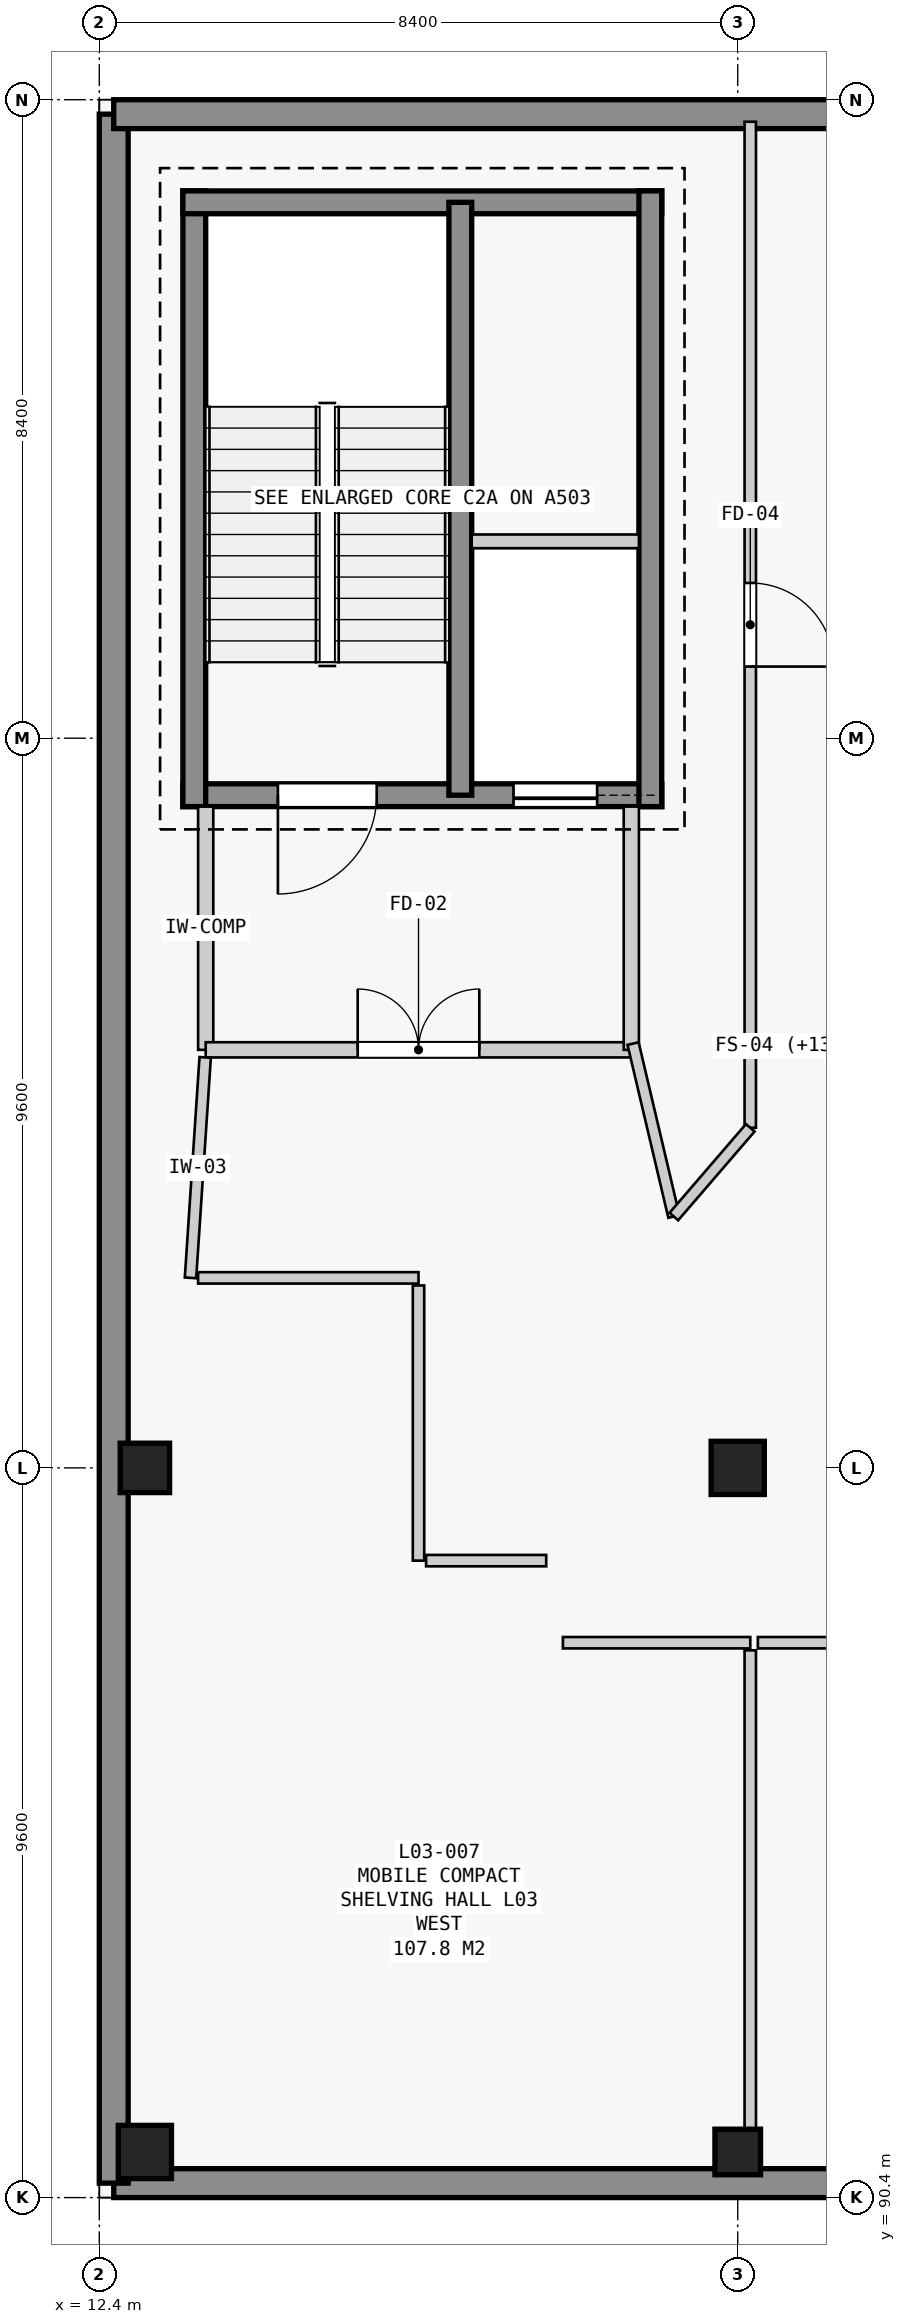
"""IFC4 building model, lengths in metres.
Left out: names, types, materials, properties, quantities, classifications, styles, units other than length and angle.
Written with IfcOpenShell. Run it as: python <this file> out.ifc"""

import sys

from ifc_helpers import new_model, si_unit, direction, frame, frame_2d, origin, origin_2d, place, context, subcontext, project, spatial, rectangle, extrude, element, fill, save


model = new_model("IFC4")
c1 = context("Model", 3, precision=1e-05, world=origin(), true_north=direction((0.0, 1.0)))
c2 = subcontext(c1, "Body", "Model", "MODEL_VIEW")
j1 = project(units=[si_unit("LENGTHUNIT", "METRE"), si_unit("PLANEANGLEUNIT", "RADIAN")], contexts=[c1])
p1 = place(None, origin())
s1 = spatial("IfcSite", under=j1, at=p1, CompositionType="ELEMENT")
p2 = place(p1, origin())
s2 = spatial("IfcBuilding", under=s1, at=p2, CompositionType="ELEMENT")
p3 = place(p2, frame((0.0, 0.0, 13.8)))
s3 = spatial("IfcBuildingStorey", under=s2, at=p3, CompositionType="ELEMENT", Elevation=13.8)
p4 = place(p3, frame((13.0, 91.0, 0.0), z_axis=(0.0, 0.0, 1.0), x_axis=(1.0, 0.0, 0.0)))
e1 = element("IfcColumn", 1, at=p4, inside=s3, PredefinedType="COLUMN", context=c2, shape_type="SweptSolid", body=[
    extrude(rectangle(XDim=0.7, YDim=0.7, at=origin_2d()), origin(), (0.0, 0.0, 1.0), 4.5),
])
p5 = place(p3, frame((13.0, 100.0, 0.0), z_axis=(0.0, 0.0, 1.0), x_axis=(1.0, 0.0, 0.0)))
e2 = element("IfcColumn", 2, at=p5, inside=s3, PredefinedType="COLUMN", context=c2, shape_type="SweptSolid", body=[
    extrude(rectangle(XDim=0.65, YDim=0.65, at=origin_2d()), origin(), (0.0, 0.0, 1.0), 4.5),
])
p6 = place(p3, frame((20.8, 91.0, 0.0), z_axis=(0.0, 0.0, 1.0), x_axis=(1.0, 0.0, 0.0)))
e3 = element("IfcColumn", 3, at=p6, inside=s3, PredefinedType="COLUMN", context=c2, shape_type="SweptSolid", body=[
    extrude(rectangle(XDim=0.6, YDim=0.6, at=origin_2d()), origin(), (0.0, 0.0, 1.0), 4.5),
])
p7 = place(p3, frame((20.8, 100.0, 0.0), z_axis=(0.0, 0.0, 1.0), x_axis=(1.0, 0.0, 0.0)))
e4 = element("IfcColumn", 4, at=p7, inside=s3, PredefinedType="COLUMN", context=c2, shape_type="SweptSolid", body=[
    extrude(rectangle(XDim=0.7, YDim=0.7, at=origin_2d()), origin(), (0.0, 0.0, 1.0), 4.5),
])
p8 = place(p3, frame((45.71, 90.59, 0.0), z_axis=(0.0, 0.0, 1.0), x_axis=(-1.0, 0.0, 0.0)))
e5 = element("IfcWall", 5, at=p8, inside=s3, PredefinedType="STANDARD", context=c2, shape_type="SweptSolid", body=[
    extrude(rectangle(XDim=33.12, YDim=0.38, at=frame_2d((16.56, 0.0))), origin(), (0.0, 0.0, 1.0), 4.18),
])
p9 = place(p3, frame((12.59, 90.59, 0.0), z_axis=(0.0, 0.0, 1.0), x_axis=(0.0, 1.0, 0.0)))
e6 = element("IfcWall", 6, at=p9, inside=s3, PredefinedType="STANDARD", context=c2, shape_type="SweptSolid", body=[
    extrude(rectangle(XDim=27.22, YDim=0.38, at=frame_2d((13.61, 0.0))), origin(), (0.0, 0.0, 1.0), 4.18),
])
p10 = place(p3, frame((12.59, 117.81, 0.0), z_axis=(0.0, 0.0, 1.0), x_axis=(1.0, 0.0, 0.0)))
e7 = element("IfcWall", 7, at=p10, inside=s3, PredefinedType="STANDARD", context=c2, shape_type="SweptSolid", body=[
    extrude(rectangle(XDim=33.12, YDim=0.38, at=frame_2d((16.56, 0.0))), origin(), (0.0, 0.0, 1.0), 4.18),
])
p11 = place(p3, frame((19.8, 108.85, 0.0), z_axis=(0.0, 0.0, 1.0), x_axis=(-1.0, 0.0, 0.0)))
e8 = element("IfcWall", 8, at=p11, inside=s3, PredefinedType="SHEAR", context=c2, shape_type="SweptSolid", body=[
    extrude(rectangle(XDim=6.3, YDim=0.3, at=frame_2d((3.15, 0.0))), origin(), (0.0, 0.0, 1.0), 4.18),
])
p12 = place(p11, frame((3.75, 0.0, 0.0)))
e9 = element("IfcOpeningElement", 9, at=p12, cuts=e8, PredefinedType="OPENING", context=c2, shape_type="SweptSolid", body=[
    extrude(rectangle(XDim=1.3, YDim=2.2, at=frame_2d((0.65, 1.1))), frame((0.0, 0.16, 0.0), z_axis=(0.0, -1.0, 0.0), x_axis=(1.0, 0.0, 0.0)), (0.0, 0.0, 1.0), 0.32),
])
p13 = place(p11, frame((0.85, 0.0, 0.0)))
e10 = element("IfcOpeningElement", 10, at=p13, cuts=e8, PredefinedType="OPENING", context=c2, shape_type="SweptSolid", body=[
    extrude(rectangle(XDim=1.1, YDim=2.15, at=frame_2d((0.55, 1.075))), frame((0.0, 0.16, 0.0), z_axis=(0.0, -1.0, 0.0), x_axis=(1.0, 0.0, 0.0)), (0.0, 0.0, 1.0), 0.32),
])
p14 = place(p3, frame((13.65, 108.7, 0.0), z_axis=(0.0, 0.0, 1.0), x_axis=(0.0, 1.0, 0.0)))
e11 = element("IfcWall", 11, at=p14, inside=s3, PredefinedType="SHEAR", context=c2, shape_type="SweptSolid", body=[
    extrude(rectangle(XDim=8.1, YDim=0.3, at=frame_2d((4.05, 0.0))), origin(), (0.0, 0.0, 1.0), 4.18),
])
p15 = place(p3, frame((13.5, 116.65, 0.0), z_axis=(0.0, 0.0, 1.0), x_axis=(1.0, 0.0, 0.0)))
e12 = element("IfcWall", 12, at=p15, inside=s3, PredefinedType="SHEAR", context=c2, shape_type="SweptSolid", body=[
    extrude(rectangle(XDim=6.3, YDim=0.3, at=frame_2d((3.15, 0.0))), origin(), (0.0, 0.0, 1.0), 4.18),
])
p16 = place(p3, frame((19.65, 116.8, 0.0), z_axis=(0.0, 0.0, 1.0), x_axis=(0.0, -1.0, 0.0)))
e13 = element("IfcWall", 13, at=p16, inside=s3, PredefinedType="SHEAR", context=c2, shape_type="SweptSolid", body=[
    extrude(rectangle(XDim=8.1, YDim=0.3, at=frame_2d((4.05, 0.0))), origin(), (0.0, 0.0, 1.0), 4.18),
])
p17 = place(p3, frame((17.15, 108.85, 0.0), z_axis=(0.0, 0.0, 1.0), x_axis=(0.0, 1.0, 0.0)))
e14 = element("IfcWall", 14, at=p17, inside=s3, PredefinedType="SHEAR", context=c2, shape_type="SweptSolid", body=[
    extrude(rectangle(XDim=7.8, YDim=0.3, at=frame_2d((3.9, 0.0))), origin(), (0.0, 0.0, 1.0), 4.18),
])
p18 = place(p3, frame((17.3, 112.19, 0.0), z_axis=(0.0, 0.0, 1.0), x_axis=(1.0, 0.0, 0.0)))
e15 = element("IfcWall", 15, at=p18, inside=s3, PredefinedType="PARTITIONING", context=c2, shape_type="SweptSolid", body=[
    extrude(rectangle(XDim=2.2, YDim=0.18, at=frame_2d((1.1, 0.0))), origin(), (0.0, 0.0, 1.0), 4.18),
])
p19 = place(p3, frame((13.8, 108.7, 0.0), z_axis=(0.0, 0.0, 1.0), x_axis=(0.0, -1.0, 0.0)))
e16 = element("IfcWall", 16, at=p19, inside=s3, PredefinedType="STANDARD", context=c2, shape_type="SweptSolid", body=[
    extrude(rectangle(XDim=3.2, YDim=0.2, at=frame_2d((1.6, 0.0))), origin(), (0.0, 0.0, 1.0), 4.18),
])
p20 = place(p3, frame((13.8, 105.5, 0.0), z_axis=(0.0, 0.0, 1.0), x_axis=(1.0, 0.0, 0.0)))
e17 = element("IfcWall", 17, at=p20, inside=s3, PredefinedType="STANDARD", context=c2, shape_type="SweptSolid", body=[
    extrude(rectangle(XDim=5.6, YDim=0.2, at=frame_2d((2.8, 0.0))), origin(), (0.0, 0.0, 1.0), 4.18),
])
p21 = place(p20, frame((2.0, 0.0, 0.0)))
e18 = element("IfcOpeningElement", 18, at=p21, cuts=e17, PredefinedType="OPENING", context=c2, shape_type="SweptSolid", body=[
    extrude(rectangle(XDim=1.6, YDim=2.2, at=frame_2d((0.8, 1.1))), frame((0.0, 0.11, 0.0), z_axis=(0.0, -1.0, 0.0), x_axis=(1.0, 0.0, 0.0)), (0.0, 0.0, 1.0), 0.22),
])
p22 = place(p3, frame((19.4, 105.5, 0.0), z_axis=(0.0, 0.0, 1.0), x_axis=(0.0, 1.0, 0.0)))
e19 = element("IfcWall", 19, at=p22, inside=s3, PredefinedType="STANDARD", context=c2, shape_type="SweptSolid", body=[
    extrude(rectangle(XDim=3.2, YDim=0.2, at=frame_2d((1.6, 0.0))), origin(), (0.0, 0.0, 1.0), 4.18),
])
p23 = place(p3, frame((19.96, 103.307, 0.0), z_axis=(0.0, 0.0, 1.0), x_axis=(-0.229592143179, 0.973286929837, 0.0)))
e20 = element("IfcWall", 20, at=p23, inside=s3, PredefinedType="PARTITIONING", context=c2, shape_type="SweptSolid", body=[
    extrude(rectangle(XDim=2.338, YDim=0.15, at=frame_2d((1.169, 0.0))), origin(), (0.0, 0.0, 1.0), 4.18),
])
p24 = place(p3, frame((13.793, 105.4, 0.0), z_axis=(0.0, 0.0, 1.0), x_axis=(-0.066440960793, -0.997790358106, 0.0)))
e21 = element("IfcWall", 21, at=p24, inside=s3, PredefinedType="PARTITIONING", context=c2, shape_type="SweptSolid", body=[
    extrude(rectangle(XDim=2.906, YDim=0.15, at=frame_2d((1.453, 0.0))), origin(), (0.0, 0.0, 1.0), 4.18),
])
p25 = place(p3, frame((13.7, 102.5, 0.0), z_axis=(0.0, 0.0, 1.0), x_axis=(1.0, 0.0, 0.0)))
e22 = element("IfcWall", 22, at=p25, inside=s3, PredefinedType="PARTITIONING", context=c2, shape_type="SweptSolid", body=[
    extrude(rectangle(XDim=2.9, YDim=0.15, at=frame_2d((1.45, 0.0))), origin(), (0.0, 0.0, 1.0), 4.18),
])
p26 = place(p3, frame((16.6, 102.4, 0.0), z_axis=(0.0, 0.0, 1.0), x_axis=(0.0, -1.0, 0.0)))
e23 = element("IfcWall", 23, at=p26, inside=s3, PredefinedType="PARTITIONING", context=c2, shape_type="SweptSolid", body=[
    extrude(rectangle(XDim=3.62, YDim=0.15, at=frame_2d((1.81, 0.0))), origin(), (0.0, 0.0, 1.0), 3.36),
])
p27 = place(p3, frame((16.7, 98.78, 0.0), z_axis=(0.0, 0.0, 1.0), x_axis=(1.0, 0.0, 0.0)))
e24 = element("IfcWall", 24, at=p27, inside=s3, PredefinedType="PARTITIONING", context=c2, shape_type="SweptSolid", body=[
    extrude(rectangle(XDim=1.58, YDim=0.15, at=frame_2d((0.79, 0.0))), origin(), (0.0, 0.0, 1.0), 3.64),
])
p28 = place(p3, frame((18.5, 97.7, 0.0), z_axis=(0.0, 0.0, 1.0), x_axis=(1.0, 0.0, 0.0)))
e25 = element("IfcWall", 25, at=p28, inside=s3, PredefinedType="PARTITIONING", context=c2, shape_type="SweptSolid", body=[
    extrude(rectangle(XDim=2.465, YDim=0.15, at=frame_2d((1.232, 0.0))), origin(), (0.0, 0.0, 1.0), 3.31),
])
p29 = place(p3, frame((20.965, 97.6, 0.0), z_axis=(0.0, 0.0, 1.0), x_axis=(0.0, -1.0, 0.0)))
e26 = element("IfcWall", 26, at=p29, inside=s3, PredefinedType="PARTITIONING", context=c2, shape_type="SweptSolid", body=[
    extrude(rectangle(XDim=6.91, YDim=0.15, at=frame_2d((3.455, 0.0))), origin(), (0.0, 0.0, 1.0), 3.31),
])
p30 = place(p3, frame((20.965, 117.71, 0.0), z_axis=(0.0, 0.0, 1.0), x_axis=(0.0, -1.0, 0.0)))
e27 = element("IfcWall", 27, at=p30, inside=s3, PredefinedType="PARTITIONING", context=c2, shape_type="SweptSolid", body=[
    extrude(rectangle(XDim=13.235, YDim=0.15, at=frame_2d((6.618, 0.0))), origin(), (0.0, 0.0, 1.0), 4.18),
])
p31 = place(p30, frame((6.068, 0.0, 0.0)))
e28 = element("IfcOpeningElement", 28, at=p31, cuts=e27, PredefinedType="OPENING", context=c2, shape_type="SweptSolid", body=[
    extrude(rectangle(XDim=1.1, YDim=2.15, at=frame_2d((0.55, 1.075))), frame((0.0, 0.085, 0.0), z_axis=(0.0, -1.0, 0.0), x_axis=(1.0, 0.0, 0.0)), (0.0, 0.0, 1.0), 0.17),
])
p32 = place(p3, frame((20.965, 104.475, 0.0), z_axis=(0.0, 0.0, 1.0), x_axis=(-0.652368947126, -0.75790154824, 0.0)))
e29 = element("IfcWall", 29, at=p32, inside=s3, PredefinedType="PARTITIONING", context=c2, shape_type="SweptSolid", body=[
    extrude(rectangle(XDim=1.541, YDim=0.15, at=frame_2d((0.771, 0.0))), origin(), (0.0, 0.0, 1.0), 4.18),
])
p33 = place(p3, frame((21.065, 97.7, 0.0), z_axis=(0.0, 0.0, 1.0), x_axis=(1.0, 0.0, 0.0)))
e30 = element("IfcWall", 30, at=p33, inside=s3, PredefinedType="PARTITIONING", context=c2, shape_type="SweptSolid", body=[
    extrude(rectangle(XDim=1.935, YDim=0.15, at=frame_2d((0.968, 0.0))), origin(), (0.0, 0.0, 1.0), 3.31),
])
p34 = place(p12, origin())
e31 = element("IfcDoor", 31, at=p34, inside=s3, OperationType="SINGLE_SWING_RIGHT", PredefinedType="DOOR", context=c2, shape_type="SweptSolid", body=[
    extrude(rectangle(XDim=1.3, YDim=2.2, at=frame_2d((0.65, 1.1))), frame((0.0, 0.025, 0.0), z_axis=(0.0, -1.0, 0.0), x_axis=(1.0, 0.0, 0.0)), (0.0, 0.0, 1.0), 0.05),
])
fill(e9, e31)
p35 = place(p13, origin())
e32 = element("IfcDoor", 32, at=p35, inside=s3, OperationType="SLIDING_TO_LEFT", PredefinedType="DOOR", context=c2, shape_type="SweptSolid", body=[
    extrude(rectangle(XDim=1.1, YDim=2.15, at=frame_2d((0.55, 1.075))), frame((0.0, 0.025, 0.0), z_axis=(0.0, -1.0, 0.0), x_axis=(1.0, 0.0, 0.0)), (0.0, 0.0, 1.0), 0.05),
])
fill(e10, e32)
p36 = place(p21, origin())
e33 = element("IfcDoor", 33, at=p36, inside=s3, OperationType="DOUBLE_DOOR_SINGLE_SWING", PredefinedType="DOOR", context=c2, shape_type="SweptSolid", body=[
    extrude(rectangle(XDim=1.6, YDim=2.2, at=frame_2d((0.8, 1.1))), frame((0.0, 0.025, 0.0), z_axis=(0.0, -1.0, 0.0), x_axis=(1.0, 0.0, 0.0)), (0.0, 0.0, 1.0), 0.05),
])
fill(e18, e33)
p37 = place(p31, origin())
e34 = element("IfcDoor", 34, at=p37, inside=s3, OperationType="SINGLE_SWING_RIGHT", PredefinedType="DOOR", context=c2, shape_type="SweptSolid", body=[
    extrude(rectangle(XDim=1.1, YDim=2.15, at=frame_2d((0.55, 1.075))), frame((0.0, 0.025, 0.0), z_axis=(0.0, -1.0, 0.0), x_axis=(1.0, 0.0, 0.0)), (0.0, 0.0, 1.0), 0.05),
])
fill(e28, e34)
save(model, sys.argv[1])
